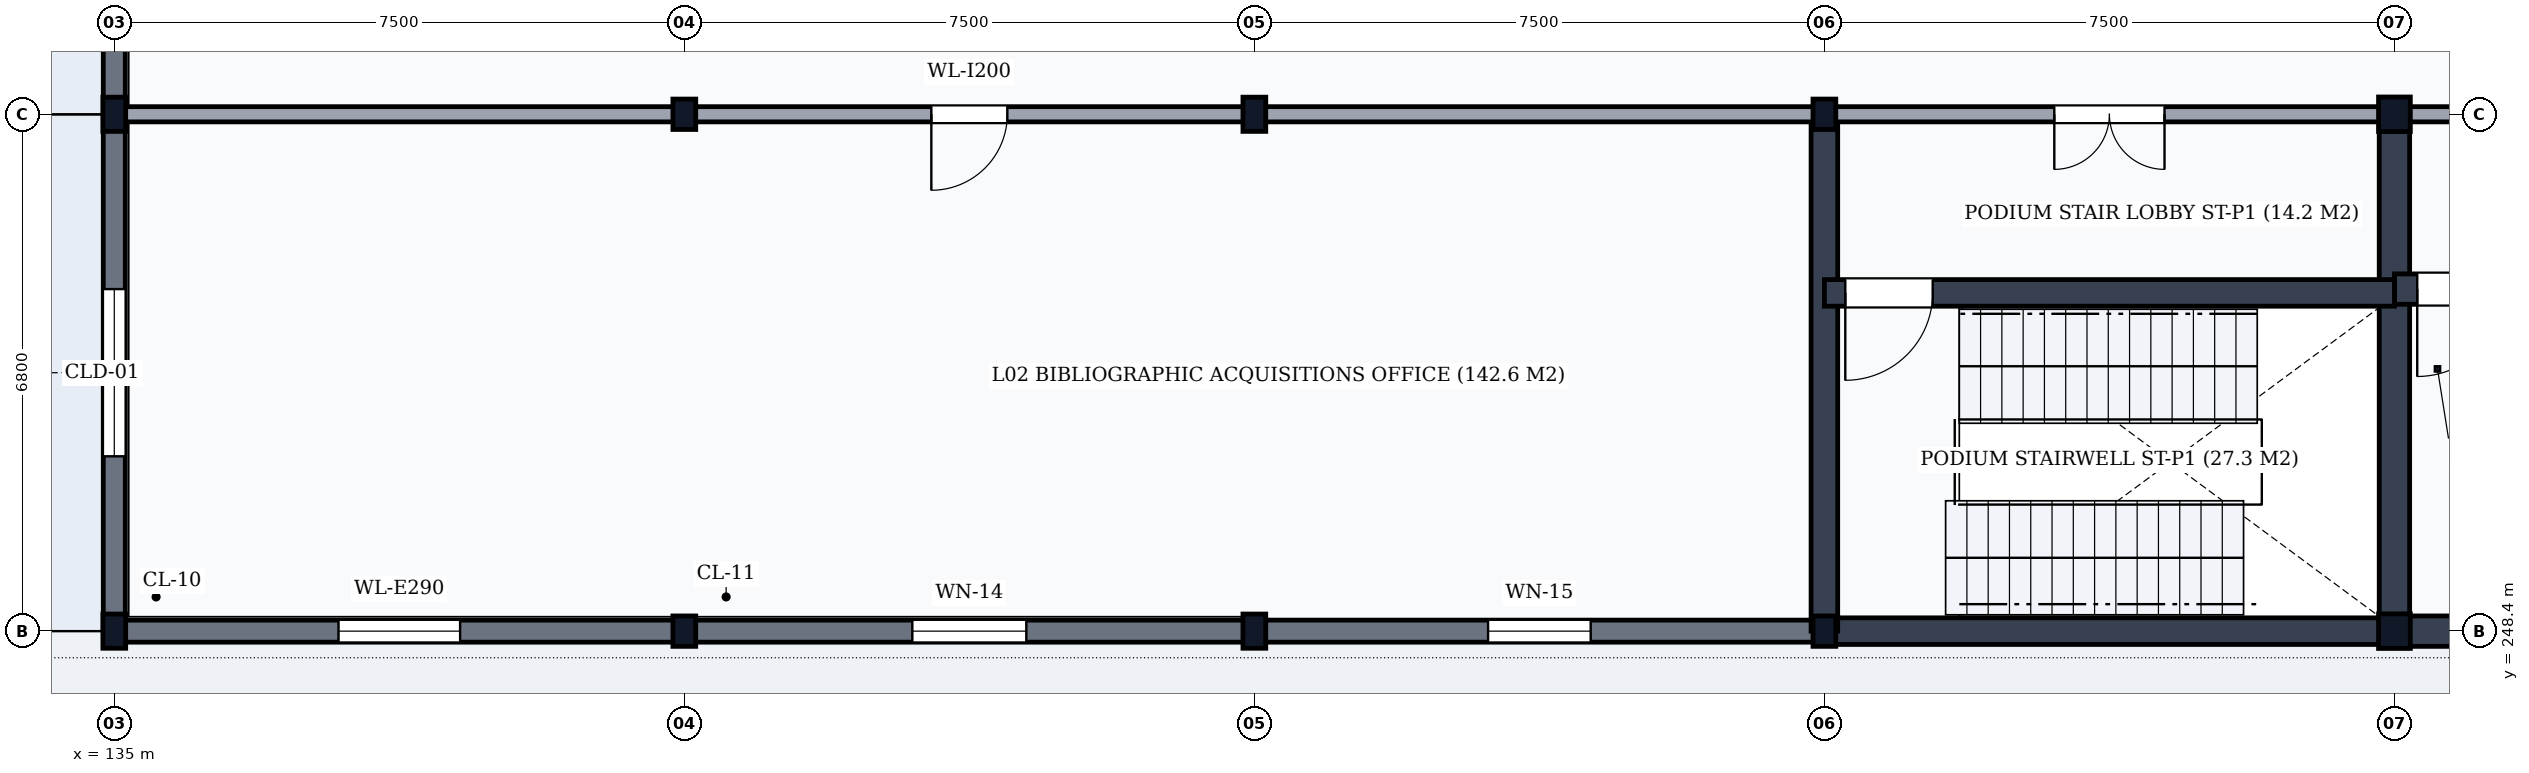
"""IFC4 building model, lengths in metres.
Left out: names, types, materials, properties, quantities, classifications, styles, units other than length and angle.
Written with IfcOpenShell. Run it as: python <this file> out.ifc"""

import sys

from ifc_helpers import new_model, si_unit, direction, frame, frame_2d, origin, origin_2d, place, context, subcontext, project, spatial, rectangle, i_section, extrude, element, fill, save


model = new_model("IFC4")
c1 = context("Model", 3, precision=1e-05, world=origin(), true_north=direction((0.0, 1.0)))
c2 = subcontext(c1, "Body", "Model", "MODEL_VIEW")
j1 = project(units=[si_unit("LENGTHUNIT", "METRE"), si_unit("PLANEANGLEUNIT", "RADIAN")], contexts=[c1])
p1 = place(None, origin())
s1 = spatial("IfcSite", under=j1, at=p1, CompositionType="ELEMENT")
p2 = place(p1, origin())
s2 = spatial("IfcBuilding", under=s1, at=p2, CompositionType="ELEMENT")
p3 = place(p2, frame((0.0, 0.0, 5.4)))
s3 = spatial("IfcBuildingStorey", under=s2, at=p3, CompositionType="ELEMENT", Elevation=5.4)
for number, where, z_axis, x_axis in (
    (1, (135.0, 248.4, 0.0), (0.0, 0.0, 1.0), (1.0, 0.0, 0.0)),
    (2, (135.0, 255.2, 0.0), (0.0, 0.0, 1.0), (1.0, 0.0, 0.0)),
):
    element("IfcColumn", number, at=place(p3, frame(where, z_axis=z_axis, x_axis=x_axis)), inside=s3, PredefinedType="COLUMN", context=c2, shape_type="SweptSolid", body=[
        extrude(i_section(OverallWidth=0.3, OverallDepth=0.45, WebThickness=0.014, FlangeThickness=0.026, FilletRadius=0.027, at=origin_2d()), origin(), (0.0, 0.0, 1.0), 5.1),
    ])
for number, where, z_axis, x_axis in (
    (3, (142.5, 248.4, 0.0), (0.0, 0.0, 1.0), (1.0, 0.0, 0.0)),
    (4, (142.5, 255.2, 0.0), (0.0, 0.0, 1.0), (1.0, 0.0, 0.0)),
):
    element("IfcColumn", number, at=place(p3, frame(where, z_axis=z_axis, x_axis=x_axis)), inside=s3, PredefinedType="COLUMN", context=c2, shape_type="SweptSolid", body=[
        extrude(i_section(OverallWidth=0.3, OverallDepth=0.4, WebThickness=0.013, FlangeThickness=0.024, FilletRadius=0.027, at=origin_2d()), origin(), (0.0, 0.0, 1.0), 5.1),
    ])
for number, where, z_axis, x_axis in (
    (5, (150.0, 248.4, 0.0), (0.0, 0.0, 1.0), (1.0, 0.0, 0.0)),
    (6, (150.0, 255.2, 0.0), (0.0, 0.0, 1.0), (1.0, 0.0, 0.0)),
):
    element("IfcColumn", number, at=place(p3, frame(where, z_axis=z_axis, x_axis=x_axis)), inside=s3, PredefinedType="COLUMN", context=c2, shape_type="SweptSolid", body=[
        extrude(i_section(OverallWidth=0.3, OverallDepth=0.45, WebThickness=0.014, FlangeThickness=0.026, FilletRadius=0.027, at=origin_2d()), origin(), (0.0, 0.0, 1.0), 5.1),
    ])
for number, where, z_axis, x_axis in (
    (7, (157.5, 248.4, 0.0), (0.0, 0.0, 1.0), (1.0, 0.0, 0.0)),
    (8, (157.5, 255.2, 0.0), (0.0, 0.0, 1.0), (1.0, 0.0, 0.0)),
):
    element("IfcColumn", number, at=place(p3, frame(where, z_axis=z_axis, x_axis=x_axis)), inside=s3, PredefinedType="COLUMN", context=c2, shape_type="SweptSolid", body=[
        extrude(i_section(OverallWidth=0.3, OverallDepth=0.4, WebThickness=0.013, FlangeThickness=0.024, FilletRadius=0.027, at=origin_2d()), origin(), (0.0, 0.0, 1.0), 5.1),
    ])
for number, where, z_axis, x_axis in (
    (9, (165.0, 248.4, 0.0), (0.0, 0.0, 1.0), (1.0, 0.0, 0.0)),
    (10, (165.0, 255.2, 0.0), (0.0, 0.0, 1.0), (1.0, 0.0, 0.0)),
):
    element("IfcColumn", number, at=place(p3, frame(where, z_axis=z_axis, x_axis=x_axis)), inside=s3, PredefinedType="COLUMN", context=c2, shape_type="SweptSolid", body=[
        extrude(i_section(OverallWidth=0.418, OverallDepth=0.455, WebThickness=0.042, FlangeThickness=0.068, FilletRadius=0.015, at=origin_2d()), origin(), (0.0, 0.0, 1.0), 5.1),
    ])
p4 = place(p3, frame((135.006, 248.4, 0.0), z_axis=(0.0, 0.0, 1.0), x_axis=(1.0, 0.0, 0.0)))
e11 = element("IfcWall", 11, at=p4, inside=s3, PredefinedType="SOLIDWALL", context=c2, shape_type="SweptSolid", body=[
    extrude(rectangle(XDim=7.488, YDim=0.29, at=frame_2d((3.744, 0.0))), origin(), (0.0, 0.0, 1.0), 4.578),
])
p5 = place(p4, frame((2.944, 0.0, 0.95)))
e12 = element("IfcOpeningElement", 12, at=p5, cuts=e11, PredefinedType="OPENING", context=c2, shape_type="SweptSolid", body=[
    extrude(rectangle(XDim=1.6, YDim=2.0, at=frame_2d((0.8, 1.0))), frame((0.0, 0.16, 0.0), z_axis=(0.0, -1.0, 0.0), x_axis=(1.0, 0.0, 0.0)), (0.0, 0.0, 1.0), 0.32),
])
p6 = place(p3, frame((142.506, 248.4, 0.0), z_axis=(0.0, 0.0, 1.0), x_axis=(1.0, 0.0, 0.0)))
e13 = element("IfcWall", 13, at=p6, inside=s3, PredefinedType="SOLIDWALL", context=c2, shape_type="SweptSolid", body=[
    extrude(rectangle(XDim=7.488, YDim=0.29, at=frame_2d((3.744, 0.0))), origin(), (0.0, 0.0, 1.0), 4.578),
])
p7 = place(p6, frame((2.994, 0.0, 0.95)))
e14 = element("IfcOpeningElement", 14, at=p7, cuts=e13, PredefinedType="OPENING", context=c2, shape_type="SweptSolid", body=[
    extrude(rectangle(XDim=1.5, YDim=1.9, at=frame_2d((0.75, 0.95))), frame((0.0, 0.16, 0.0), z_axis=(0.0, -1.0, 0.0), x_axis=(1.0, 0.0, 0.0)), (0.0, 0.0, 1.0), 0.32),
])
p8 = place(p3, frame((150.006, 248.4, 0.0), z_axis=(0.0, 0.0, 1.0), x_axis=(1.0, 0.0, 0.0)))
e15 = element("IfcWall", 15, at=p8, inside=s3, PredefinedType="SOLIDWALL", context=c2, shape_type="SweptSolid", body=[
    extrude(rectangle(XDim=7.488, YDim=0.29, at=frame_2d((3.744, 0.0))), origin(), (0.0, 0.0, 1.0), 4.578),
])
p9 = place(p8, frame((3.069, 0.0, 0.95)))
e16 = element("IfcOpeningElement", 16, at=p9, cuts=e15, PredefinedType="OPENING", context=c2, shape_type="SweptSolid", body=[
    extrude(rectangle(XDim=1.35, YDim=1.8, at=frame_2d((0.675, 0.9))), frame((0.0, 0.16, 0.0), z_axis=(0.0, -1.0, 0.0), x_axis=(1.0, 0.0, 0.0)), (0.0, 0.0, 1.0), 0.32),
])
p10 = place(p3, frame((135.0, 248.406, 0.0), z_axis=(0.0, 0.0, 1.0), x_axis=(0.0, 1.0, 0.0)))
e17 = element("IfcWall", 17, at=p10, inside=s3, PredefinedType="SOLIDWALL", context=c2, shape_type="SweptSolid", body=[
    extrude(rectangle(XDim=6.788, YDim=0.29, at=frame_2d((3.394, 0.0))), origin(), (0.0, 0.0, 1.0), 4.618),
])
p11 = place(p10, frame((2.294, 0.0, 0.95)))
e18 = element("IfcOpeningElement", 18, at=p11, cuts=e17, PredefinedType="OPENING", context=c2, shape_type="SweptSolid", body=[
    extrude(rectangle(XDim=2.2, YDim=2.8, at=frame_2d((1.1, 1.4))), frame((0.0, 0.16, 0.0), z_axis=(0.0, -1.0, 0.0), x_axis=(1.0, 0.0, 0.0)), (0.0, 0.0, 1.0), 0.32),
])
p12 = place(p3, frame((135.0, 255.206, 0.0), z_axis=(0.0, 0.0, 1.0), x_axis=(0.0, 1.0, 0.0)))
e19 = element("IfcWall", 19, at=p12, inside=s3, PredefinedType="SOLIDWALL", context=c2, shape_type="SweptSolid", body=[
    extrude(rectangle(XDim=7.588, YDim=0.29, at=frame_2d((3.794, 0.0))), origin(), (0.0, 0.0, 1.0), 4.578),
])
p13 = place(p12, frame((4.066, 0.0, 0.95)))
e20 = element("IfcOpeningElement", 20, at=p13, cuts=e19, PredefinedType="OPENING", context=c2, shape_type="SweptSolid", body=[
    extrude(rectangle(XDim=2.0, YDim=2.6, at=frame_2d((1.0, 1.3))), frame((0.0, 0.16, 0.0), z_axis=(0.0, -1.0, 0.0), x_axis=(1.0, 0.0, 0.0)), (0.0, 0.0, 1.0), 0.32),
])
p14 = place(p3, frame((135.1, 248.5, 5.1), z_axis=(0.0, 0.0, 1.0), x_axis=(1.0, 0.0, 0.0)))
e21 = element("IfcWall", 21, at=p14, inside=s3, PredefinedType="PARAPET", context=c2, shape_type="SweptSolid", body=[
    extrude(rectangle(XDim=14.8, YDim=0.18, at=frame_2d((7.4, 0.0))), origin(), (0.0, 0.0, 1.0), 1.2),
])
p15 = place(p3, frame((135.1, 248.6, 5.1), z_axis=(0.0, 0.0, 1.0), x_axis=(0.0, 1.0, 0.0)))
e22 = element("IfcWall", 22, at=p15, inside=s3, PredefinedType="PARAPET", context=c2, shape_type="SweptSolid", body=[
    extrude(rectangle(XDim=89.2, YDim=0.18, at=frame_2d((44.6, 0.0))), origin(), (0.0, 0.0, 1.0), 1.2),
])
p16 = place(p3, frame((165.0, 248.4, 0.0), z_axis=(0.0, 0.0, 1.0), x_axis=(1.0, 0.0, 0.0)))
e23 = element("IfcWall", 23, at=p16, inside=s3, PredefinedType="SHEAR", context=c2, shape_type="SweptSolid", body=[
    extrude(rectangle(XDim=8.0, YDim=0.4, at=frame_2d((4.0, 0.0))), origin(), (0.0, 0.0, 1.0), 4.86),
])
p17 = place(p3, frame((165.0, 248.4, 0.0), z_axis=(0.0, 0.0, 1.0), x_axis=(0.0, 1.0, 0.0)))
e24 = element("IfcWall", 24, at=p17, inside=s3, PredefinedType="SHEAR", context=c2, shape_type="SweptSolid", body=[
    extrude(rectangle(XDim=6.8, YDim=0.4, at=frame_2d((3.4, 0.0))), origin(), (0.0, 0.0, 1.0), 4.86),
])
p18 = place(p3, frame((165.0, 252.9, 0.0), z_axis=(0.0, 0.0, 1.0), x_axis=(1.0, 0.0, 0.0)))
e25 = element("IfcWall", 25, at=p18, inside=s3, PredefinedType="SHEAR", context=c2, shape_type="SweptSolid", body=[
    extrude(rectangle(XDim=8.0, YDim=0.4, at=frame_2d((4.0, 0.0))), origin(), (0.0, 0.0, 1.0), 4.86),
])
p19 = place(p18, frame((0.3, 0.0, 0.0)))
e26 = element("IfcOpeningElement", 26, at=p19, cuts=e25, PredefinedType="OPENING", context=c2, shape_type="SweptSolid", body=[
    extrude(rectangle(XDim=1.15, YDim=2.15, at=frame_2d((0.575, 1.075))), frame((0.0, 0.215, 0.0), z_axis=(0.0, -1.0, 0.0), x_axis=(1.0, 0.0, 0.0)), (0.0, 0.0, 1.0), 0.43),
])
p20 = place(p3, frame((165.0, 255.2, 0.0), z_axis=(0.0, 0.0, 1.0), x_axis=(1.0, 0.0, 0.0)))
e27 = element("IfcWall", 27, at=p20, inside=s3, PredefinedType="PARTITIONING", context=c2, shape_type="SweptSolid", body=[
    extrude(rectangle(XDim=8.0, YDim=0.2, at=frame_2d((4.0, 0.0))), origin(), (0.0, 0.0, 1.0), 4.358),
])
p21 = place(p20, frame((3.275, 0.0, 0.0)))
e28 = element("IfcOpeningElement", 28, at=p21, cuts=e27, PredefinedType="OPENING", context=c2, shape_type="SweptSolid", body=[
    extrude(rectangle(XDim=1.45, YDim=2.2, at=frame_2d((0.725, 1.1))), frame((0.0, 0.115, 0.0), z_axis=(0.0, -1.0, 0.0), x_axis=(1.0, 0.0, 0.0)), (0.0, 0.0, 1.0), 0.23),
])
p22 = place(p3, frame((157.5, 248.4, 0.0), z_axis=(0.0, 0.0, 1.0), x_axis=(1.0, 0.0, 0.0)))
e29 = element("IfcWall", 29, at=p22, inside=s3, PredefinedType="SHEAR", context=c2, shape_type="SweptSolid", body=[
    extrude(rectangle(XDim=7.5, YDim=0.35, at=frame_2d((3.75, 0.0))), origin(), (0.0, 0.0, 1.0), 4.86),
])
p23 = place(p3, frame((157.5, 248.4, 0.0), z_axis=(0.0, 0.0, 1.0), x_axis=(0.0, 1.0, 0.0)))
e30 = element("IfcWall", 30, at=p23, inside=s3, PredefinedType="SHEAR", context=c2, shape_type="SweptSolid", body=[
    extrude(rectangle(XDim=6.8, YDim=0.35, at=frame_2d((3.4, 0.0))), origin(), (0.0, 0.0, 1.0), 4.86),
])
p24 = place(p3, frame((157.5, 252.85, 0.0), z_axis=(0.0, 0.0, 1.0), x_axis=(1.0, 0.0, 0.0)))
e31 = element("IfcWall", 31, at=p24, inside=s3, PredefinedType="SHEAR", context=c2, shape_type="SweptSolid", body=[
    extrude(rectangle(XDim=7.5, YDim=0.35, at=frame_2d((3.75, 0.0))), origin(), (0.0, 0.0, 1.0), 4.86),
])
p25 = place(p24, frame((0.275, 0.0, 0.0)))
e32 = element("IfcOpeningElement", 32, at=p25, cuts=e31, PredefinedType="OPENING", context=c2, shape_type="SweptSolid", body=[
    extrude(rectangle(XDim=1.15, YDim=2.15, at=frame_2d((0.575, 1.075))), frame((0.0, 0.19, 0.0), z_axis=(0.0, -1.0, 0.0), x_axis=(1.0, 0.0, 0.0)), (0.0, 0.0, 1.0), 0.38),
])
p26 = place(p3, frame((157.5, 255.2, 0.0), z_axis=(0.0, 0.0, 1.0), x_axis=(1.0, 0.0, 0.0)))
e33 = element("IfcWall", 33, at=p26, inside=s3, PredefinedType="PARTITIONING", context=c2, shape_type="SweptSolid", body=[
    extrude(rectangle(XDim=7.5, YDim=0.2, at=frame_2d((3.75, 0.0))), origin(), (0.0, 0.0, 1.0), 4.498),
])
p27 = place(p26, frame((3.025, 0.0, 0.0)))
e34 = element("IfcOpeningElement", 34, at=p27, cuts=e33, PredefinedType="OPENING", context=c2, shape_type="SweptSolid", body=[
    extrude(rectangle(XDim=1.45, YDim=2.2, at=frame_2d((0.725, 1.1))), frame((0.0, 0.115, 0.0), z_axis=(0.0, -1.0, 0.0), x_axis=(1.0, 0.0, 0.0)), (0.0, 0.0, 1.0), 0.23),
])
p28 = place(p3, frame((135.0, 255.2, 0.0), z_axis=(0.0, 0.0, 1.0), x_axis=(1.0, 0.0, 0.0)))
e35 = element("IfcWall", 35, at=p28, inside=s3, PredefinedType="PARTITIONING", context=c2, shape_type="SweptSolid", body=[
    extrude(rectangle(XDim=22.5, YDim=0.2, at=frame_2d((11.25, 0.0))), origin(), (0.0, 0.0, 1.0), 4.488),
])
p29 = place(p28, frame((10.75, 0.0, 0.0)))
e36 = element("IfcOpeningElement", 36, at=p29, cuts=e35, PredefinedType="OPENING", context=c2, shape_type="SweptSolid", body=[
    extrude(rectangle(XDim=1.0, YDim=2.1, at=frame_2d((0.5, 1.05))), frame((0.0, 0.115, 0.0), z_axis=(0.0, -1.0, 0.0), x_axis=(1.0, 0.0, 0.0)), (0.0, 0.0, 1.0), 0.23),
])
p30 = place(p5, origin())
e37 = element("IfcWindow", 37, at=p30, inside=s3, PartitioningType="SINGLE_PANEL", PredefinedType="WINDOW", context=c2, shape_type="SweptSolid", body=[
    extrude(rectangle(XDim=1.6, YDim=2.0, at=frame_2d((0.8, 1.0))), frame((0.0, 0.03, 0.0), z_axis=(0.0, -1.0, 0.0), x_axis=(1.0, 0.0, 0.0)), (0.0, 0.0, 1.0), 0.06),
])
fill(e12, e37)
p31 = place(p7, origin())
e38 = element("IfcWindow", 38, at=p31, inside=s3, PartitioningType="SINGLE_PANEL", PredefinedType="WINDOW", context=c2, shape_type="SweptSolid", body=[
    extrude(rectangle(XDim=1.5, YDim=1.9, at=frame_2d((0.75, 0.95))), frame((0.0, 0.03, 0.0), z_axis=(0.0, -1.0, 0.0), x_axis=(1.0, 0.0, 0.0)), (0.0, 0.0, 1.0), 0.06),
])
fill(e14, e38)
p32 = place(p9, origin())
e39 = element("IfcWindow", 39, at=p32, inside=s3, PartitioningType="SINGLE_PANEL", PredefinedType="WINDOW", context=c2, shape_type="SweptSolid", body=[
    extrude(rectangle(XDim=1.35, YDim=1.8, at=frame_2d((0.675, 0.9))), frame((0.0, 0.03, 0.0), z_axis=(0.0, -1.0, 0.0), x_axis=(1.0, 0.0, 0.0)), (0.0, 0.0, 1.0), 0.06),
])
fill(e16, e39)
p33 = place(p11, origin())
e40 = element("IfcWindow", 40, at=p33, inside=s3, PartitioningType="DOUBLE_PANEL_VERTICAL", PredefinedType="WINDOW", context=c2, shape_type="SweptSolid", body=[
    extrude(rectangle(XDim=2.2, YDim=2.8, at=frame_2d((1.1, 1.4))), frame((0.0, 0.03, 0.0), z_axis=(0.0, -1.0, 0.0), x_axis=(1.0, 0.0, 0.0)), (0.0, 0.0, 1.0), 0.06),
])
fill(e18, e40)
p34 = place(p19, frame((1.15, 0.0, 0.0), z_axis=(0.0, 0.0, 1.0), x_axis=(-1.0, 0.0, 0.0)))
e41 = element("IfcDoor", 41, at=p34, inside=s3, OperationType="SINGLE_SWING_RIGHT", PredefinedType="DOOR", context=c2, shape_type="SweptSolid", body=[
    extrude(rectangle(XDim=1.15, YDim=2.15, at=frame_2d((0.575, 1.075))), frame((0.0, 0.025, 0.0), z_axis=(0.0, -1.0, 0.0), x_axis=(1.0, 0.0, 0.0)), (0.0, 0.0, 1.0), 0.05),
])
fill(e26, e41)
p35 = place(p25, frame((1.15, 0.0, 0.0), z_axis=(0.0, 0.0, 1.0), x_axis=(-1.0, 0.0, 0.0)))
e42 = element("IfcDoor", 42, at=p35, inside=s3, OperationType="SINGLE_SWING_RIGHT", PredefinedType="DOOR", context=c2, shape_type="SweptSolid", body=[
    extrude(rectangle(XDim=1.15, YDim=2.15, at=frame_2d((0.575, 1.075))), frame((0.0, 0.025, 0.0), z_axis=(0.0, -1.0, 0.0), x_axis=(1.0, 0.0, 0.0)), (0.0, 0.0, 1.0), 0.05),
])
fill(e32, e42)
p36 = place(p27, frame((1.45, 0.0, 0.0), z_axis=(0.0, 0.0, 1.0), x_axis=(-1.0, 0.0, 0.0)))
e43 = element("IfcDoor", 43, at=p36, inside=s3, OperationType="DOUBLE_DOOR_SINGLE_SWING", PredefinedType="DOOR", context=c2, shape_type="SweptSolid", body=[
    extrude(rectangle(XDim=1.45, YDim=2.2, at=frame_2d((0.725, 1.1))), frame((0.0, 0.025, 0.0), z_axis=(0.0, -1.0, 0.0), x_axis=(1.0, 0.0, 0.0)), (0.0, 0.0, 1.0), 0.05),
])
fill(e34, e43)
p37 = place(p29, frame((1.0, 0.0, 0.0), z_axis=(0.0, 0.0, 1.0), x_axis=(-1.0, 0.0, 0.0)))
e44 = element("IfcDoor", 44, at=p37, inside=s3, OperationType="SINGLE_SWING_RIGHT", PredefinedType="DOOR", context=c2, shape_type="SweptSolid", body=[
    extrude(rectangle(XDim=1.0, YDim=2.1, at=frame_2d((0.5, 1.05))), frame((0.0, 0.025, 0.0), z_axis=(0.0, -1.0, 0.0), x_axis=(1.0, 0.0, 0.0)), (0.0, 0.0, 1.0), 0.05),
])
fill(e36, e44)
save(model, sys.argv[1])
